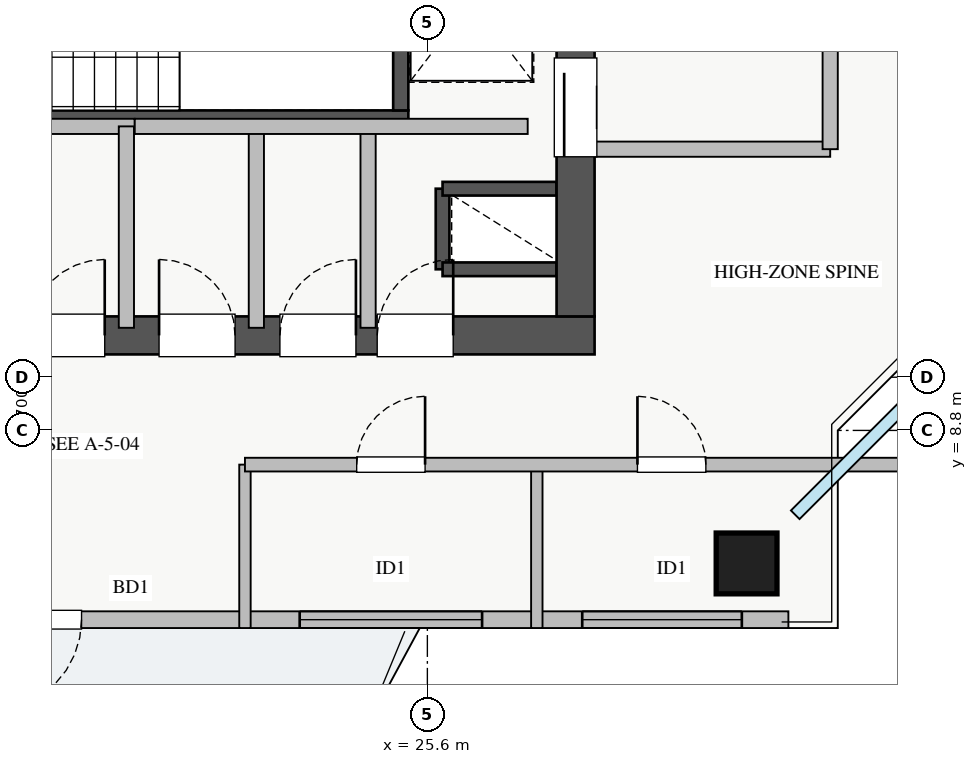
"""IFC4 building model, lengths in metres.
Left out: names, types, materials, properties, quantities, classifications, styles, units other than length and angle.
Written with IfcOpenShell. Run it as: python <this file> out.ifc"""

import sys

from ifc_helpers import new_model, si_unit, direction, frame, frame_2d, origin, origin_2d, place, context, subcontext, project, spatial, rectangle, extrude, source, transform, mapped, element, fill, save


model = new_model("IFC4")
c1 = context("Model", 3, precision=1e-05, world=origin(), true_north=direction((0.0, 1.0)))
c2 = subcontext(c1, "Body", "Model", "MODEL_VIEW")
j1 = project(units=[si_unit("LENGTHUNIT", "METRE"), si_unit("PLANEANGLEUNIT", "RADIAN")], contexts=[c1])
p1 = place(None, origin())
s1 = spatial("IfcSite", under=j1, at=p1, CompositionType="ELEMENT")
p2 = place(p1, origin())
s2 = spatial("IfcBuilding", under=s1, at=p2, CompositionType="ELEMENT")
p3 = place(p2, frame((0.0, 0.0, 193.75)))
s3 = spatial("IfcBuildingStorey", under=s2, at=p3, CompositionType="ELEMENT", Elevation=193.75)
p4 = place(p3, frame((25.8, 10.92, 0.0), z_axis=(0.0, 0.0, 1.0), x_axis=(0.0, 1.0, 0.0)))
e1 = element("IfcWall", 1, at=p4, inside=s3, PredefinedType="SHEAR", context=c2, shape_type="SweptSolid", body=[
    extrude(rectangle(XDim=1.06, YDim=0.18, at=frame_2d((0.53, 0.0))), origin(), (0.0, 0.0, 1.0), 3.07),
])
for number, where, z_axis, x_axis in (
    (2, (25.8, 11.98, 0.0), (0.0, 0.0, 1.0), (1.0, 0.0, 0.0)),
    (3, (25.8, 10.92, 0.0), (0.0, 0.0, 1.0), (1.0, 0.0, 0.0)),
):
    element("IfcWall", number, at=place(p3, frame(where, z_axis=z_axis, x_axis=x_axis)), inside=s3, PredefinedType="SHEAR", context=c2, shape_type="SweptSolid", body=[
        extrude(rectangle(XDim=1.5, YDim=0.18, at=frame_2d((0.75, 0.0))), origin(), (0.0, 0.0, 1.0), 3.07),
    ])
p5 = place(p3, frame((18.2, 12.91, 0.0), z_axis=(0.0, 0.0, 1.0), x_axis=(1.0, 0.0, 0.0)))
e4 = element("IfcWall", 4, at=p5, inside=s3, PredefinedType="SHEAR", context=c2, shape_type="SweptSolid", body=[
    extrude(rectangle(XDim=7.15, YDim=0.2, at=frame_2d((3.575, 0.0))), origin(), (0.0, 0.0, 1.0), 3.25),
])
p6 = place(p5, frame((0.35, 0.0, 0.0)))
e5 = element("IfcOpeningElement", 5, at=p6, cuts=e4, PredefinedType="OPENING", context=c2, shape_type="SweptSolid", body=[
    extrude(rectangle(XDim=1.1, YDim=2.05, at=frame_2d((0.55, 1.025))), frame((0.0, 0.11, 0.0), z_axis=(0.0, -1.0, 0.0), x_axis=(1.0, 0.0, 0.0)), (0.0, 0.0, 1.0), 0.22),
])
p7 = place(p3, frame((25.25, 13.01, 0.0), z_axis=(0.0, 0.0, 1.0), x_axis=(0.0, 1.0, 0.0)))
e6 = element("IfcWall", 6, at=p7, inside=s3, PredefinedType="SHEAR", context=c2, shape_type="SweptSolid", body=[
    extrude(rectangle(XDim=2.94, YDim=0.2, at=frame_2d((1.47, 0.0))), origin(), (0.0, 0.0, 1.0), 3.25),
])
p8 = place(p3, frame((10.2, 10.05, 0.0), z_axis=(0.0, 0.0, 1.0), x_axis=(1.0, 0.0, 0.0)))
e7 = element("IfcWall", 7, at=p8, inside=s3, PredefinedType="SHEAR", context=c2, shape_type="SweptSolid", body=[
    extrude(rectangle(XDim=17.6, YDim=0.5, at=frame_2d((8.8, 0.0))), origin(), (0.0, 0.0, 1.0), 3.25),
])
p9 = place(p8, frame((1.15, 0.0, 0.0)))
e8 = element("IfcOpeningElement", 8, at=p9, cuts=e7, PredefinedType="OPENING", context=c2, shape_type="SweptSolid", body=[
    extrude(rectangle(XDim=1.1, YDim=2.05, at=frame_2d((0.55, 1.025))), frame((0.0, 0.26, 0.0), z_axis=(0.0, -1.0, 0.0), x_axis=(1.0, 0.0, 0.0)), (0.0, 0.0, 1.0), 0.52),
])
p10 = place(p8, frame((8.3, 0.0, 0.0)))
e9 = element("IfcOpeningElement", 9, at=p10, cuts=e7, PredefinedType="OPENING", context=c2, shape_type="SweptSolid", body=[
    extrude(rectangle(XDim=1.1, YDim=2.05, at=frame_2d((0.55, 1.025))), frame((0.0, 0.26, 0.0), z_axis=(0.0, -1.0, 0.0), x_axis=(1.0, 0.0, 0.0)), (0.0, 0.0, 1.0), 0.52),
])
p11 = place(p8, frame((2.85, 0.0, 0.0)))
e10 = element("IfcOpeningElement", 10, at=p11, cuts=e7, PredefinedType="OPENING", context=c2, shape_type="SweptSolid", body=[
    extrude(rectangle(XDim=1.1, YDim=2.05, at=frame_2d((0.55, 1.025))), frame((0.0, 0.26, 0.0), z_axis=(0.0, -1.0, 0.0), x_axis=(1.0, 0.0, 0.0)), (0.0, 0.0, 1.0), 0.52),
])
p12 = place(p8, frame((5.8, 0.0, 0.0)))
e11 = element("IfcOpeningElement", 11, at=p12, cuts=e7, PredefinedType="OPENING", context=c2, shape_type="SweptSolid", body=[
    extrude(rectangle(XDim=1.0, YDim=2.05, at=frame_2d((0.5, 1.025))), frame((0.0, 0.26, 0.0), z_axis=(0.0, -1.0, 0.0), x_axis=(1.0, 0.0, 0.0)), (0.0, 0.0, 1.0), 0.52),
])
p13 = place(p8, frame((14.74, 0.0, 0.0)))
e12 = element("IfcOpeningElement", 12, at=p13, cuts=e7, PredefinedType="OPENING", context=c2, shape_type="SweptSolid", body=[
    extrude(rectangle(XDim=1.0, YDim=2.05, at=frame_2d((0.5, 1.025))), frame((0.0, 0.26, 0.0), z_axis=(0.0, -1.0, 0.0), x_axis=(1.0, 0.0, 0.0)), (0.0, 0.0, 1.0), 0.52),
])
p14 = place(p8, frame((10.155, 0.0, 0.0)))
e13 = element("IfcOpeningElement", 13, at=p14, cuts=e7, PredefinedType="OPENING", context=c2, shape_type="SweptSolid", body=[
    extrude(rectangle(XDim=1.0, YDim=2.05, at=frame_2d((0.5, 1.025))), frame((0.0, 0.26, 0.0), z_axis=(0.0, -1.0, 0.0), x_axis=(1.0, 0.0, 0.0)), (0.0, 0.0, 1.0), 0.52),
])
p15 = place(p8, frame((11.87, 0.0, 0.0)))
e14 = element("IfcOpeningElement", 14, at=p15, cuts=e7, PredefinedType="OPENING", context=c2, shape_type="SweptSolid", body=[
    extrude(rectangle(XDim=1.0, YDim=2.05, at=frame_2d((0.5, 1.025))), frame((0.0, 0.26, 0.0), z_axis=(0.0, -1.0, 0.0), x_axis=(1.0, 0.0, 0.0)), (0.0, 0.0, 1.0), 0.52),
])
p16 = place(p8, frame((13.46, 0.0, 0.0)))
e15 = element("IfcOpeningElement", 15, at=p16, cuts=e7, PredefinedType="OPENING", context=c2, shape_type="SweptSolid", body=[
    extrude(rectangle(XDim=1.0, YDim=2.05, at=frame_2d((0.5, 1.025))), frame((0.0, 0.26, 0.0), z_axis=(0.0, -1.0, 0.0), x_axis=(1.0, 0.0, 0.0)), (0.0, 0.0, 1.0), 0.52),
])
p17 = place(p3, frame((27.55, 10.3, 0.0), z_axis=(0.0, 0.0, 1.0), x_axis=(0.0, 1.0, 0.0)))
e16 = element("IfcWall", 16, at=p17, inside=s3, PredefinedType="SHEAR", context=c2, shape_type="SweptSolid", body=[
    extrude(rectangle(XDim=6.2, YDim=0.5, at=frame_2d((3.1, 0.0))), origin(), (0.0, 0.0, 1.0), 3.25),
])
p18 = place(p17, frame((2.1, 0.0, 0.0)))
e17 = element("IfcOpeningElement", 17, at=p18, cuts=e16, PredefinedType="OPENING", context=c2, shape_type="SweptSolid", body=[
    extrude(rectangle(XDim=1.3, YDim=2.05, at=frame_2d((0.65, 1.025))), frame((0.0, 0.26, 0.0), z_axis=(0.0, -1.0, 0.0), x_axis=(1.0, 0.0, 0.0)), (0.0, 0.0, 1.0), 0.52),
])
m1 = source(origin(), c2, "Body", "SweptSolid", [
    extrude(rectangle(XDim=0.8, YDim=0.8, at=origin_2d()), origin(), (0.0, 0.0, 1.0), 3.25),
])
p19 = place(p3, frame((29.8, 7.05, 0.0), z_axis=(0.0, 0.0, 1.0), x_axis=(1.0, 0.0, 0.0)))
e18 = element("IfcColumn", 18, at=p19, inside=s3, PredefinedType="COLUMN", context=c2, shape_type="MappedRepresentation", body=[
    mapped(m1, transform((0.0, 0.0, 0.0), x_axis=(1.0, 0.0, 0.0), y_axis=(0.0, 1.0, 0.0), z_axis=(0.0, 0.0, 1.0), scale=1.0)),
])
p20 = place(p3, frame((7.65, 6.31, 0.0), z_axis=(0.0, 0.0, 1.0), x_axis=(1.0, 0.0, 0.0)))
e19 = element("IfcWall", 19, at=p20, inside=s3, PredefinedType="STANDARD", context=c2, shape_type="SweptSolid", body=[
    extrude(rectangle(XDim=22.7, YDim=0.22, at=frame_2d((11.35, 0.0))), origin(), (0.0, 0.0, 1.0), 2.61),
])
p21 = place(p20, frame((12.2, 0.0, 0.0)))
e20 = element("IfcOpeningElement", 20, at=p21, cuts=e19, PredefinedType="OPENING", context=c2, shape_type="SweptSolid", body=[
    extrude(rectangle(XDim=1.2, YDim=2.1, at=frame_2d((0.6, 1.05))), frame((0.0, 0.12, 0.0), z_axis=(0.0, -1.0, 0.0), x_axis=(1.0, 0.0, 0.0)), (0.0, 0.0, 1.0), 0.24),
])
p22 = place(p20, frame((1.637, 0.0, 0.9)))
e21 = element("IfcOpeningElement", 21, at=p22, cuts=e19, PredefinedType="OPENING", context=c2, shape_type="SweptSolid", body=[
    extrude(rectangle(XDim=2.4, YDim=1.48, at=frame_2d((1.2, 0.74))), frame((0.0, 0.12, 0.0), z_axis=(0.0, -1.0, 0.0), x_axis=(1.0, 0.0, 0.0)), (0.0, 0.0, 1.0), 0.24),
])
p23 = place(p20, frame((7.612, 0.0, 0.9)))
e22 = element("IfcOpeningElement", 22, at=p23, cuts=e19, PredefinedType="OPENING", context=c2, shape_type="SweptSolid", body=[
    extrude(rectangle(XDim=1.8, YDim=1.45, at=frame_2d((0.9, 0.725))), frame((0.0, 0.12, 0.0), z_axis=(0.0, -1.0, 0.0), x_axis=(1.0, 0.0, 0.0)), (0.0, 0.0, 1.0), 0.24),
])
p24 = place(p20, frame((19.988, 0.0, 0.9)))
e23 = element("IfcOpeningElement", 23, at=p24, cuts=e19, PredefinedType="OPENING", context=c2, shape_type="SweptSolid", body=[
    extrude(rectangle(XDim=2.1, YDim=1.5, at=frame_2d((1.05, 0.75))), frame((0.0, 0.12, 0.0), z_axis=(0.0, -1.0, 0.0), x_axis=(1.0, 0.0, 0.0)), (0.0, 0.0, 1.0), 0.24),
])
p25 = place(p20, frame((16.27, 0.0, 0.9)))
e24 = element("IfcOpeningElement", 24, at=p25, cuts=e19, PredefinedType="OPENING", context=c2, shape_type="SweptSolid", body=[
    extrude(rectangle(XDim=2.4, YDim=1.5, at=frame_2d((1.2, 0.75))), frame((0.0, 0.12, 0.0), z_axis=(0.0, -1.0, 0.0), x_axis=(1.0, 0.0, 0.0)), (0.0, 0.0, 1.0), 0.24),
])
p26 = place(p3, frame((27.8, 12.5, 0.0), z_axis=(0.0, 0.0, 1.0), x_axis=(1.0, 0.0, 0.0)))
e25 = element("IfcWall", 25, at=p26, inside=s3, PredefinedType="PARTITIONING", context=c2, shape_type="SweptSolid", body=[
    extrude(rectangle(XDim=3.1, YDim=0.2, at=frame_2d((1.55, 0.0))), origin(), (0.0, 0.0, 1.0), 2.265),
])
p27 = place(p3, frame((30.9, 12.5, 0.0), z_axis=(0.0, 0.0, 1.0), x_axis=(0.0, 1.0, 0.0)))
e26 = element("IfcWall", 26, at=p27, inside=s3, PredefinedType="PARTITIONING", context=c2, shape_type="SweptSolid", body=[
    extrude(rectangle(XDim=3.9, YDim=0.2, at=frame_2d((1.95, 0.0))), origin(), (0.0, 0.0, 1.0), 3.07),
])
p28 = place(p27, frame((1.4, 0.0, 0.0)))
e27 = element("IfcOpeningElement", 27, at=p28, cuts=e26, PredefinedType="OPENING", context=c2, shape_type="SweptSolid", body=[
    extrude(rectangle(XDim=1.1, YDim=2.05, at=frame_2d((0.55, 1.025))), frame((0.0, 0.11, 0.0), z_axis=(0.0, -1.0, 0.0), x_axis=(1.0, 0.0, 0.0)), (0.0, 0.0, 1.0), 0.22),
])
p29 = place(p3, frame((24.82, 10.15, 0.0), z_axis=(0.0, 0.0, 1.0), x_axis=(0.0, 1.0, 0.0)))
e28 = element("IfcWall", 28, at=p29, inside=s3, PredefinedType="PARTITIONING", context=c2, shape_type="SweptSolid", body=[
    extrude(rectangle(XDim=2.65, YDim=0.2, at=frame_2d((1.325, 0.0))), origin(), (0.0, 0.0, 1.0), 3.07),
])
p30 = place(p3, frame((19.88, 12.8, 0.0), z_axis=(0.0, 0.0, 1.0), x_axis=(1.0, 0.0, 0.0)))
e29 = element("IfcWall", 29, at=p30, inside=s3, PredefinedType="PARTITIONING", context=c2, shape_type="SweptSolid", body=[
    extrude(rectangle(XDim=1.87, YDim=0.2, at=frame_2d((0.935, 0.0))), origin(), (0.0, 0.0, 1.0), 3.07),
])
for number, where, z_axis, x_axis in (
    (30, (21.64, 10.15, 0.0), (0.0, 0.0, 1.0), (0.0, 1.0, 0.0)),
    (31, (23.35, 10.15, 0.0), (0.0, 0.0, 1.0), (0.0, 1.0, 0.0)),
):
    element("IfcWall", number, at=place(p3, frame(where, z_axis=z_axis, x_axis=x_axis)), inside=s3, PredefinedType="PARTITIONING", context=c2, shape_type="SweptSolid", body=[
        extrude(rectangle(XDim=2.65, YDim=0.2, at=frame_2d((1.325, 0.0))), origin(), (0.0, 0.0, 1.0), 3.07),
    ])
p31 = place(p3, frame((21.75, 12.8, 0.0), z_axis=(0.0, 0.0, 1.0), x_axis=(1.0, 0.0, 0.0)))
e32 = element("IfcWall", 32, at=p31, inside=s3, PredefinedType="PARTITIONING", context=c2, shape_type="SweptSolid", body=[
    extrude(rectangle(XDim=5.17, YDim=0.2, at=frame_2d((2.585, 0.0))), origin(), (0.0, 0.0, 1.0), 3.07),
])
for number, where, z_axis, x_axis in (
    (33, (23.2, 6.2, 0.0), (0.0, 0.0, 1.0), (0.0, 1.0, 0.0)),
    (34, (27.04, 6.2, 0.0), (0.0, 0.0, 1.0), (0.0, 1.0, 0.0)),
):
    element("IfcWall", number, at=place(p3, frame(where, z_axis=z_axis, x_axis=x_axis)), inside=s3, PredefinedType="PARTITIONING", context=c2, shape_type="SweptSolid", body=[
        extrude(rectangle(XDim=2.15, YDim=0.15, at=frame_2d((1.075, 0.0))), origin(), (0.0, 0.0, 1.0), 3.07),
    ])
p32 = place(p3, frame((23.2, 8.35, 0.0), z_axis=(0.0, 0.0, 1.0), x_axis=(1.0, 0.0, 0.0)))
e35 = element("IfcWall", 35, at=p32, inside=s3, PredefinedType="PARTITIONING", context=c2, shape_type="SweptSolid", body=[
    extrude(rectangle(XDim=9.25, YDim=0.18, at=frame_2d((4.625, 0.0))), origin(), (0.0, 0.0, 1.0), 3.07),
])
p33 = place(p32, frame((1.47, 0.0, 0.0)))
e36 = element("IfcOpeningElement", 36, at=p33, cuts=e35, PredefinedType="OPENING", context=c2, shape_type="SweptSolid", body=[
    extrude(rectangle(XDim=0.9, YDim=2.05, at=frame_2d((0.45, 1.025))), frame((0.0, 0.1, 0.0), z_axis=(0.0, -1.0, 0.0), x_axis=(1.0, 0.0, 0.0)), (0.0, 0.0, 1.0), 0.2),
])
p34 = place(p32, frame((5.164, 0.0, 0.0)))
e37 = element("IfcOpeningElement", 37, at=p34, cuts=e35, PredefinedType="OPENING", context=c2, shape_type="SweptSolid", body=[
    extrude(rectangle(XDim=0.9, YDim=2.05, at=frame_2d((0.45, 1.025))), frame((0.0, 0.1, 0.0), z_axis=(0.0, -1.0, 0.0), x_axis=(1.0, 0.0, 0.0)), (0.0, 0.0, 1.0), 0.2),
])
m2 = source(origin(), c2, "Body", "SweptSolid", [
    extrude(rectangle(XDim=1.2, YDim=2.1, at=frame_2d((0.6, 1.05))), frame((0.0, 0.025, 0.0), z_axis=(0.0, -1.0, 0.0), x_axis=(1.0, 0.0, 0.0)), (0.0, 0.0, 1.0), 0.05),
])
p35 = place(p21, frame((1.2, 0.0, 0.0), z_axis=(0.0, 0.0, 1.0), x_axis=(-1.0, 0.0, 0.0)))
e38 = element("IfcDoor", 38, at=p35, inside=s3, OperationType="SINGLE_SWING_LEFT", PredefinedType="DOOR", context=c2, shape_type="MappedRepresentation", body=[
    mapped(m2, transform((0.0, 0.0, 0.0), x_axis=(1.0, 0.0, 0.0), y_axis=(0.0, 1.0, 0.0), z_axis=(0.0, 0.0, 1.0), scale=1.0)),
])
fill(e20, e38)
m3 = source(origin(), c2, "Body", "SweptSolid", [
    extrude(rectangle(XDim=2.1, YDim=1.5, at=frame_2d((1.05, 0.75))), frame((0.0, 0.03, 0.0), z_axis=(0.0, -1.0, 0.0), x_axis=(1.0, 0.0, 0.0)), (0.0, 0.0, 1.0), 0.06),
])
p36 = place(p24, origin())
e39 = element("IfcWindow", 39, at=p36, inside=s3, PartitioningType="TRIPLE_PANEL_VERTICAL", PredefinedType="WINDOW", context=c2, shape_type="MappedRepresentation", body=[
    mapped(m3, transform((0.0, 0.0, 0.0), x_axis=(1.0, 0.0, 0.0), y_axis=(0.0, 1.0, 0.0), z_axis=(0.0, 0.0, 1.0), scale=1.0)),
])
fill(e23, e39)
m4 = source(origin(), c2, "Body", "SweptSolid", [
    extrude(rectangle(XDim=1.3, YDim=2.05, at=frame_2d((0.65, 1.025))), frame((0.0, 0.025, 0.0), z_axis=(0.0, -1.0, 0.0), x_axis=(1.0, 0.0, 0.0)), (0.0, 0.0, 1.0), 0.05),
])
p37 = place(p18, origin())
e40 = element("IfcDoor", 40, at=p37, inside=s3, OperationType="SLIDING_TO_RIGHT", PredefinedType="DOOR", context=c2, shape_type="MappedRepresentation", body=[
    mapped(m4, transform((0.0, 0.0, 0.0), x_axis=(1.0, 0.0, 0.0), y_axis=(0.0, 1.0, 0.0), z_axis=(0.0, 0.0, 1.0), scale=1.0)),
])
fill(e17, e40)
m5 = source(origin(), c2, "Body", "SweptSolid", [
    extrude(rectangle(XDim=1.0, YDim=2.05, at=frame_2d((0.5, 1.025))), frame((0.0, 0.025, 0.0), z_axis=(0.0, -1.0, 0.0), x_axis=(1.0, 0.0, 0.0)), (0.0, 0.0, 1.0), 0.05),
])
p38 = place(p13, origin())
e41 = element("IfcDoor", 41, at=p38, inside=s3, OperationType="SINGLE_SWING_RIGHT", PredefinedType="DOOR", context=c2, shape_type="MappedRepresentation", body=[
    mapped(m5, transform((0.0, 0.0, 0.0), x_axis=(1.0, 0.0, 0.0), y_axis=(0.0, 1.0, 0.0), z_axis=(0.0, 0.0, 1.0), scale=1.0)),
])
fill(e12, e41)
p39 = place(p14, origin())
e42 = element("IfcDoor", 42, at=p39, inside=s3, OperationType="SINGLE_SWING_RIGHT", PredefinedType="DOOR", context=c2, shape_type="MappedRepresentation", body=[
    mapped(m5, transform((0.0, 0.0, 0.0), x_axis=(1.0, 0.0, 0.0), y_axis=(0.0, 1.0, 0.0), z_axis=(0.0, 0.0, 1.0), scale=1.0)),
])
fill(e13, e42)
p40 = place(p15, origin())
e43 = element("IfcDoor", 43, at=p40, inside=s3, OperationType="SINGLE_SWING_LEFT", PredefinedType="DOOR", context=c2, shape_type="MappedRepresentation", body=[
    mapped(m5, transform((0.0, 0.0, 0.0), x_axis=(1.0, 0.0, 0.0), y_axis=(0.0, 1.0, 0.0), z_axis=(0.0, 0.0, 1.0), scale=1.0)),
])
fill(e14, e43)
p41 = place(p16, origin())
e44 = element("IfcDoor", 44, at=p41, inside=s3, OperationType="SINGLE_SWING_RIGHT", PredefinedType="DOOR", context=c2, shape_type="MappedRepresentation", body=[
    mapped(m5, transform((0.0, 0.0, 0.0), x_axis=(1.0, 0.0, 0.0), y_axis=(0.0, 1.0, 0.0), z_axis=(0.0, 0.0, 1.0), scale=1.0)),
])
fill(e15, e44)
m6 = source(origin(), c2, "Body", "SweptSolid", [
    extrude(rectangle(XDim=0.9, YDim=2.05, at=frame_2d((0.45, 1.025))), frame((0.0, 0.025, 0.0), z_axis=(0.0, -1.0, 0.0), x_axis=(1.0, 0.0, 0.0)), (0.0, 0.0, 1.0), 0.05),
])
p42 = place(p33, origin())
e45 = element("IfcDoor", 45, at=p42, inside=s3, OperationType="SINGLE_SWING_RIGHT", PredefinedType="DOOR", context=c2, shape_type="MappedRepresentation", body=[
    mapped(m6, transform((0.0, 0.0, 0.0), x_axis=(1.0, 0.0, 0.0), y_axis=(0.0, 1.0, 0.0), z_axis=(0.0, 0.0, 1.0), scale=1.0)),
])
fill(e36, e45)
p43 = place(p34, origin())
e46 = element("IfcDoor", 46, at=p43, inside=s3, OperationType="SINGLE_SWING_LEFT", PredefinedType="DOOR", context=c2, shape_type="MappedRepresentation", body=[
    mapped(m6, transform((0.0, 0.0, 0.0), x_axis=(1.0, 0.0, 0.0), y_axis=(0.0, 1.0, 0.0), z_axis=(0.0, 0.0, 1.0), scale=1.0)),
])
fill(e37, e46)
m7 = source(origin(), c2, "Body", "SweptSolid", [
    extrude(rectangle(XDim=2.4, YDim=1.5, at=frame_2d((1.2, 0.75))), frame((0.0, 0.03, 0.0), z_axis=(0.0, -1.0, 0.0), x_axis=(1.0, 0.0, 0.0)), (0.0, 0.0, 1.0), 0.06),
])
p44 = place(p25, origin())
e47 = element("IfcWindow", 47, at=p44, inside=s3, PartitioningType="TRIPLE_PANEL_VERTICAL", PredefinedType="WINDOW", context=c2, shape_type="MappedRepresentation", body=[
    mapped(m7, transform((0.0, 0.0, 0.0), x_axis=(1.0, 0.0, 0.0), y_axis=(0.0, 1.0, 0.0), z_axis=(0.0, 0.0, 1.0), scale=1.0)),
])
fill(e24, e47)
save(model, sys.argv[1])
